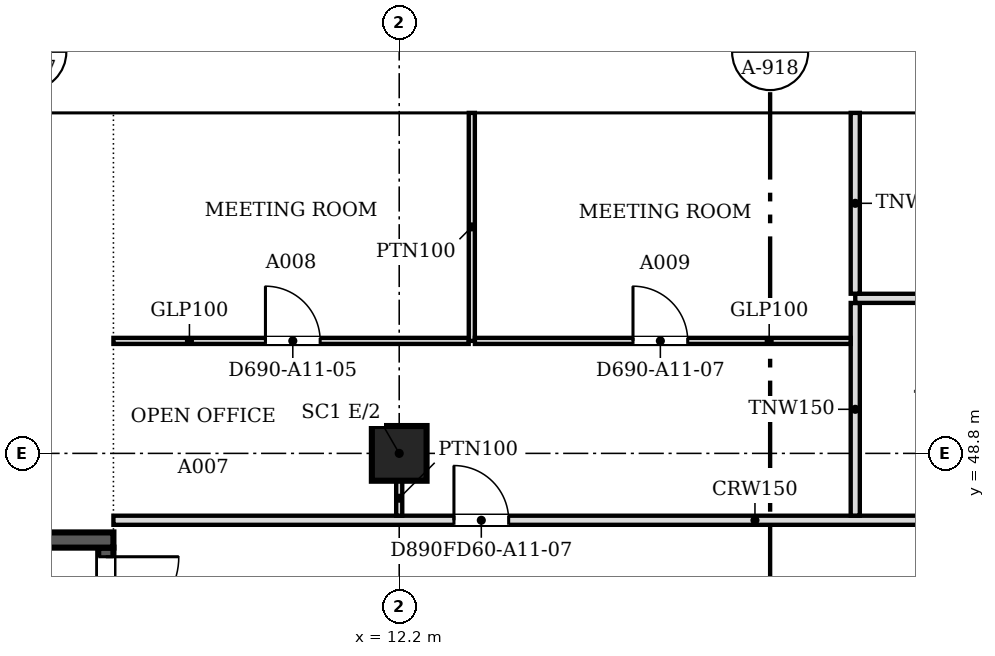
"""IFC4 building model, lengths in metres.
Left out: names, types, materials, properties, quantities, classifications, styles, units other than length and angle.
Written with IfcOpenShell. Run it as: python <this file> out.ifc"""

import sys

from ifc_helpers import new_model, si_unit, direction, frame, frame_2d, origin, origin_2d, place, context, subcontext, project, spatial, polyline, rectangle, outline, extrude, faceted_brep, source, transform, mapped, element, fill, save


model = new_model("IFC4")
c1 = context("Model", 3, precision=1e-05, world=origin(), true_north=direction((0.0, 1.0)))
c2 = subcontext(c1, "Body", "Model", "MODEL_VIEW")
j1 = project(units=[si_unit("LENGTHUNIT", "METRE"), si_unit("PLANEANGLEUNIT", "RADIAN")], contexts=[c1])
p1 = place(None, origin())
s1 = spatial("IfcSite", under=j1, at=p1, CompositionType="ELEMENT")
p2 = place(p1, origin())
s2 = spatial("IfcBuilding", under=s1, at=p2, CompositionType="ELEMENT")
p3 = place(p2, frame((0.0, 0.0, 124.0)))
s3 = spatial("IfcBuildingStorey", under=s2, at=p3, CompositionType="ELEMENT", Elevation=124.0)
p4 = place(p3, frame((12.2, 48.8, 0.0), z_axis=(0.0, 0.0, 1.0), x_axis=(1.0, 0.0, 0.0)))
e1 = element("IfcColumn", 1, at=p4, inside=s3, PredefinedType="COLUMN", context=c2, shape_type="SweptSolid", body=[
    extrude(rectangle(XDim=0.9, YDim=0.9, at=origin_2d()), origin(), (0.0, 0.0, 1.0), 3.6),
])
m1 = source(origin(), c2, "Body", "Brep", [
    faceted_brep([(3.05, -0.25, 0.0), (6.1, -0.25, 3.8), (6.1, -0.25, 3.8), (3.05, -0.25, 7.6), (0.0, -0.25, 3.8), (0.0, 0.25, 3.8), (3.05, 0.25, 7.6), (6.1, 0.25, 3.8), (6.1, 0.25, 3.8), (3.05, 0.25, 0.0)], [[[0, 1, 2, 3, 4]], [[5, 6, 7, 8, 9]], [[9, 8, 1, 0]], [[7, 6, 3, 2]], [[6, 5, 4, 3]], [[5, 9, 0, 4]], [[1, 8, 7, 2]]]),
])
p5 = place(p3, frame((24.4, 54.65, -3.8), z_axis=(0.0, 0.0, 1.0), x_axis=(-1.0, 0.0, 0.0)))
e2 = element("IfcWall", 2, at=p5, inside=s3, PredefinedType="SOLIDWALL", context=c2, shape_type="MappedRepresentation", body=[
    mapped(m1, transform((0.0, 0.0, 0.0), scale=1.0)),
])
m2 = source(origin(), c2, "Body", "SweptSolid", [
    extrude(outline(polyline([(3.05, 0.399), (5.78, 3.8), (3.05, 7.201), (0.321, 3.8), (3.05, 0.399)])), frame((0.0, 0.26, 0.0), z_axis=(0.0, -1.0, 0.0), x_axis=(1.0, 0.0, 0.0)), (0.0, 0.0, 1.0), 0.52),
])
p6 = place(p5, origin())
e3 = element("IfcOpeningElement", 3, at=p6, cuts=e2, PredefinedType="OPENING", context=c2, shape_type="MappedRepresentation", body=[
    mapped(m2, transform((0.0, 0.0, 0.0), scale=1.0)),
])
m3 = source(origin(), c2, "Body", "SweptSolid", [
    extrude(outline(polyline([(3.05, 0.0), (6.1, 3.8), (3.05, 7.6), (0.0, 3.8), (3.05, 0.0)])), frame((0.0, 0.25, 0.0), z_axis=(0.0, -1.0, 0.0), x_axis=(1.0, 0.0, 0.0)), (0.0, 0.0, 1.0), 0.5),
])
p7 = place(p3, frame((18.3, 54.65, -3.8), z_axis=(0.0, 0.0, 1.0), x_axis=(-1.0, 0.0, 0.0)))
e4 = element("IfcWall", 4, at=p7, inside=s3, PredefinedType="SOLIDWALL", context=c2, shape_type="MappedRepresentation", body=[
    mapped(m3, transform((0.0, 0.0, 0.0), scale=1.0)),
])
p8 = place(p7, origin())
e5 = element("IfcOpeningElement", 5, at=p8, cuts=e4, PredefinedType="OPENING", context=c2, shape_type="MappedRepresentation", body=[
    mapped(m2, transform((0.0, 0.0, 0.0), scale=1.0)),
])
m4 = source(origin(), c2, "Body", "Brep", [
    faceted_brep([(3.05, -0.25, 0.0), (6.053, -0.25, 3.8), (3.05, -0.25, 7.6), (0.0, -0.25, 3.8), (0.0, 0.25, 3.8), (3.05, 0.25, 7.6), (6.007, 0.25, 3.859), (6.007, 0.25, 3.741), (3.05, 0.25, 0.0), (6.053, 0.0, 3.8)], [[[0, 1, 2, 3]], [[4, 5, 6, 7, 8]], [[8, 7, 9, 1, 0]], [[6, 5, 2, 1, 9]], [[5, 4, 3, 2]], [[4, 8, 0, 3]], [[9, 7, 6]]]),
])
p9 = place(p3, frame((12.2, 54.65, -3.8), z_axis=(0.0, 0.0, 1.0), x_axis=(-1.0, 0.0, 0.0)))
e6 = element("IfcWall", 6, at=p9, inside=s3, PredefinedType="SOLIDWALL", context=c2, shape_type="MappedRepresentation", body=[
    mapped(m4, transform((0.0, 0.0, 0.0), scale=1.0)),
])
m5 = source(origin(), c2, "Body", "SweptSolid", [
    extrude(outline(polyline([(3.049, 0.401), (5.735, 3.8), (3.049, 7.199), (0.321, 3.8), (3.049, 0.401)])), frame((0.0, 0.26, 0.0), z_axis=(0.0, -1.0, 0.0), x_axis=(1.0, 0.0, 0.0)), (0.0, 0.0, 1.0), 0.52),
])
p10 = place(p9, origin())
e7 = element("IfcOpeningElement", 7, at=p10, cuts=e6, PredefinedType="OPENING", context=c2, shape_type="MappedRepresentation", body=[
    mapped(m5, transform((0.0, 0.0, 0.0), scale=1.0)),
])
p11 = place(p2, frame((0.0, 0.0, 127.8)))
s4 = spatial("IfcBuildingStorey", under=s2, at=p11, CompositionType="ELEMENT", Elevation=127.8)
p12 = place(p11, frame((21.35, 54.65, -3.8), z_axis=(0.0, 0.0, 1.0), x_axis=(-1.0, 0.0, 0.0)))
e8 = element("IfcWall", 8, at=p12, inside=s4, PredefinedType="SOLIDWALL", context=c2, shape_type="MappedRepresentation", body=[
    mapped(m3, transform((0.0, 0.0, 0.0), scale=1.0)),
])
p13 = place(p12, origin())
e9 = element("IfcOpeningElement", 9, at=p13, cuts=e8, PredefinedType="OPENING", context=c2, shape_type="MappedRepresentation", body=[
    mapped(m2, transform((0.0, 0.0, 0.0), scale=1.0)),
])
p14 = place(p11, frame((15.25, 54.65, -3.8), z_axis=(0.0, 0.0, 1.0), x_axis=(-1.0, 0.0, 0.0)))
e10 = element("IfcWall", 10, at=p14, inside=s4, PredefinedType="SOLIDWALL", context=c2, shape_type="MappedRepresentation", body=[
    mapped(m3, transform((0.0, 0.0, 0.0), scale=1.0)),
])
p15 = place(p14, origin())
e11 = element("IfcOpeningElement", 11, at=p15, cuts=e10, PredefinedType="OPENING", context=c2, shape_type="MappedRepresentation", body=[
    mapped(m2, transform((0.0, 0.0, 0.0), scale=1.0)),
])
m6 = source(origin(), c2, "Body", "Brep", [
    faceted_brep([(3.003, -0.25, 0.0), (3.05, -0.25, 0.06), (3.05, -0.25, 7.54), (3.003, -0.25, 7.6), (0.0, -0.25, 3.8), (0.0, 0.25, 3.8), (2.957, 0.25, 7.541), (2.957, 0.25, 0.059), (3.003, 0.0, 0.0), (3.003, 0.0, 7.6)], [[[0, 1, 2, 3, 4]], [[5, 6, 7]], [[1, 0, 8]], [[9, 3, 2]], [[6, 5, 4, 3, 9]], [[5, 7, 8, 0, 4]], [[1, 8, 7, 6, 9, 2]]]),
])
p16 = place(p11, frame((9.15, 54.65, -3.8), z_axis=(0.0, 0.0, 1.0), x_axis=(-1.0, 0.0, 0.0)))
e12 = element("IfcWall", 12, at=p16, inside=s4, PredefinedType="SOLIDWALL", context=c2, shape_type="MappedRepresentation", body=[
    mapped(m6, transform((0.0, 0.0, 0.0), scale=1.0)),
])
m7 = source(origin(), c2, "Body", "SweptSolid", [
    extrude(outline(polyline([(2.803, 6.944), (0.319, 3.8), (2.803, 0.656), (2.803, 6.944)])), frame((0.0, 0.26, 0.0), z_axis=(0.0, -1.0, 0.0), x_axis=(1.0, 0.0, 0.0)), (0.0, 0.0, 1.0), 0.52),
])
p17 = place(p16, origin())
e13 = element("IfcOpeningElement", 13, at=p17, cuts=e12, PredefinedType="OPENING", context=c2, shape_type="MappedRepresentation", body=[
    mapped(m7, transform((0.0, 0.0, 0.0), scale=1.0)),
])
p18 = place(p3, frame((3.6, 47.375, 0.0), z_axis=(0.0, 0.0, 1.0), x_axis=(1.0, 0.0, 0.0)))
e14 = element("IfcWall", 14, at=p18, inside=s3, PredefinedType="SOLIDWALL", context=c2, shape_type="SweptSolid", body=[
    extrude(rectangle(XDim=3.9, YDim=0.25, at=frame_2d((1.95, 0.0))), origin(), (0.0, 0.0, 1.0), 3.8),
])
p19 = place(p3, frame((7.375, 47.25, 0.0), z_axis=(0.0, 0.0, 1.0), x_axis=(0.0, -1.0, 0.0)))
e15 = element("IfcWall", 15, at=p19, inside=s3, PredefinedType="SOLIDWALL", context=c2, shape_type="SweptSolid", body=[
    extrude(rectangle(XDim=8.0, YDim=0.25, at=frame_2d((4.0, 0.0))), origin(), (0.0, 0.0, 1.0), 3.8),
])
m8 = source(origin(), c2, "Body", "SweptSolid", [
    extrude(rectangle(XDim=1.2, YDim=2.1, at=frame_2d((0.6, 1.05))), frame((0.0, 0.135, 0.0), z_axis=(0.0, -1.0, 0.0), x_axis=(1.0, 0.0, 0.0)), (0.0, 0.0, 1.0), 0.27),
])
p20 = place(p19, frame((0.15, 0.0, 0.0)))
e16 = element("IfcOpeningElement", 16, at=p20, cuts=e15, PredefinedType="OPENING", context=c2, shape_type="MappedRepresentation", body=[
    mapped(m8, transform((0.0, 0.0, 0.0), scale=1.0)),
])
p21 = place(p3, frame((7.5, 47.7, 0.0), z_axis=(0.0, 0.0, 1.0), x_axis=(1.0, 0.0, 0.0)))
e17 = element("IfcWall", 17, at=p21, inside=s3, PredefinedType="PARTITIONING", context=c2, shape_type="SweptSolid", body=[
    extrude(rectangle(XDim=20.6, YDim=0.15, at=frame_2d((10.3, 0.0))), origin(), (0.0, 0.0, 1.0), 3.067),
])
m9 = source(origin(), c2, "Body", "SweptSolid", [
    extrude(rectangle(XDim=1.8, YDim=2.1, at=frame_2d((0.9, 1.05))), frame((0.0, 0.085, 0.0), z_axis=(0.0, -1.0, 0.0), x_axis=(1.0, 0.0, 0.0)), (0.0, 0.0, 1.0), 0.17),
])
p22 = place(p21, frame((14.601, 0.0, 0.0)))
e18 = element("IfcOpeningElement", 18, at=p22, cuts=e17, PredefinedType="OPENING", context=c2, shape_type="MappedRepresentation", body=[
    mapped(m9, transform((0.0, 0.0, 0.0), scale=1.0)),
])
m10 = source(origin(), c2, "Body", "SweptSolid", [
    extrude(rectangle(XDim=0.9, YDim=2.1, at=frame_2d((0.45, 1.05))), frame((0.0, 0.085, 0.0), z_axis=(0.0, -1.0, 0.0), x_axis=(1.0, 0.0, 0.0)), (0.0, 0.0, 1.0), 0.17),
])
p23 = place(p21, frame((5.6, 0.0, 0.0)))
e19 = element("IfcOpeningElement", 19, at=p23, cuts=e17, PredefinedType="OPENING", context=c2, shape_type="MappedRepresentation", body=[
    mapped(m10, transform((0.0, 0.0, 0.0), scale=1.0)),
])
p24 = place(p3, frame((19.7, 47.776, 0.0), z_axis=(0.0, 0.0, 1.0), x_axis=(0.0, 1.0, 0.0)))
e20 = element("IfcWall", 20, at=p24, inside=s3, PredefinedType="PARTITIONING", context=c2, shape_type="SweptSolid", body=[
    extrude(rectangle(XDim=3.498, YDim=0.15, at=frame_2d((1.749, 0.0))), origin(), (0.0, 0.0, 1.0), 3.067),
])
p25 = place(p3, frame((12.2, 48.35, 0.0), z_axis=(0.0, 0.0, 1.0), x_axis=(0.0, -1.0, 0.0)))
e21 = element("IfcWall", 21, at=p25, inside=s3, PredefinedType="PARTITIONING", context=c2, shape_type="SweptSolid", body=[
    extrude(rectangle(XDim=0.575, YDim=0.1, at=frame_2d((0.288, 0.0))), origin(), (0.0, 0.0, 1.0), 3.067),
])
p26 = place(p3, frame((7.5, 50.65, 0.0), z_axis=(0.0, 0.0, 1.0), x_axis=(1.0, 0.0, 0.0)))
e22 = element("IfcWall", 22, at=p26, inside=s3, PredefinedType="PARTITIONING", context=c2, shape_type="SweptSolid", body=[
    extrude(rectangle(XDim=5.843, YDim=0.1, at=frame_2d((2.921, 0.0))), origin(), (0.0, 0.0, 1.0), 3.067),
])
m11 = source(origin(), c2, "Body", "SweptSolid", [
    extrude(rectangle(XDim=0.9, YDim=2.1, at=frame_2d((0.45, 1.05))), frame((0.0, 0.06, 0.0), z_axis=(0.0, -1.0, 0.0), x_axis=(1.0, 0.0, 0.0)), (0.0, 0.0, 1.0), 0.12),
])
p27 = place(p26, frame((2.5, 0.0, 0.0)))
e23 = element("IfcOpeningElement", 23, at=p27, cuts=e22, PredefinedType="OPENING", context=c2, shape_type="MappedRepresentation", body=[
    mapped(m11, transform((0.0, 0.0, 0.0), scale=1.0)),
])
p28 = place(p3, frame((13.394, 50.65, 0.0), z_axis=(0.0, 0.0, 1.0), x_axis=(0.0, 1.0, 0.0)))
e24 = element("IfcWall", 24, at=p28, inside=s3, PredefinedType="PARTITIONING", context=c2, shape_type="SweptSolid", body=[
    extrude(rectangle(XDim=3.75, YDim=0.1, at=frame_2d((1.875, 0.0))), origin(), (0.0, 0.0, 1.0), 3.067),
])
p29 = place(p3, frame((13.445, 50.65, 0.0), z_axis=(0.0, 0.0, 1.0), x_axis=(1.0, 0.0, 0.0)))
e25 = element("IfcWall", 25, at=p29, inside=s3, PredefinedType="PARTITIONING", context=c2, shape_type="SweptSolid", body=[
    extrude(rectangle(XDim=6.179, YDim=0.1, at=frame_2d((3.09, 0.0))), origin(), (0.0, 0.0, 1.0), 3.067),
])
p30 = place(p29, frame((2.6, 0.0, 0.0)))
e26 = element("IfcOpeningElement", 26, at=p30, cuts=e25, PredefinedType="OPENING", context=c2, shape_type="MappedRepresentation", body=[
    mapped(m11, transform((0.0, 0.0, 0.0), scale=1.0)),
])
p31 = place(p3, frame((19.7, 51.35, 0.0), z_axis=(0.0, 0.0, 1.0), x_axis=(1.0, 0.0, 0.0)))
e27 = element("IfcWall", 27, at=p31, inside=s3, PredefinedType="PARTITIONING", context=c2, shape_type="SweptSolid", body=[
    extrude(rectangle(XDim=8.4, YDim=0.15, at=frame_2d((4.2, 0.0))), origin(), (0.0, 0.0, 1.0), 3.067),
])
p32 = place(p31, frame((3.7, 0.0, 0.0)))
e28 = element("IfcOpeningElement", 28, at=p32, cuts=e27, PredefinedType="OPENING", context=c2, shape_type="MappedRepresentation", body=[
    mapped(m10, transform((0.0, 0.0, 0.0), scale=1.0)),
])
p33 = place(p3, frame((19.7, 51.426, 0.0), z_axis=(0.0, 0.0, 1.0), x_axis=(0.0, 1.0, 0.0)))
e29 = element("IfcWall", 29, at=p33, inside=s3, PredefinedType="PARTITIONING", context=c2, shape_type="SweptSolid", body=[
    extrude(rectangle(XDim=2.974, YDim=0.15, at=frame_2d((1.487, 0.0))), origin(), (0.0, 0.0, 1.0), 3.067),
])
m12 = source(origin(), c2, "Body", "SweptSolid", [
    extrude(rectangle(XDim=1.2, YDim=2.1, at=frame_2d((0.6, 1.05))), frame((0.0, 0.025, 0.0), z_axis=(0.0, -1.0, 0.0), x_axis=(1.0, 0.0, 0.0)), (0.0, 0.0, 1.0), 0.05),
])
p34 = place(p20, origin())
e30 = element("IfcDoor", 30, at=p34, inside=s3, OperationType="SINGLE_SWING_LEFT", PredefinedType="DOOR", context=c2, shape_type="MappedRepresentation", body=[
    mapped(m12, transform((0.0, 0.0, 0.0), scale=1.0)),
])
fill(e16, e30)
m13 = source(origin(), c2, "Body", "SweptSolid", [
    extrude(rectangle(XDim=0.9, YDim=2.1, at=frame_2d((0.45, 1.05))), frame((0.0, 0.025, 0.0), z_axis=(0.0, -1.0, 0.0), x_axis=(1.0, 0.0, 0.0)), (0.0, 0.0, 1.0), 0.05),
])
p35 = place(p27, origin())
e31 = element("IfcDoor", 31, at=p35, inside=s3, OperationType="SINGLE_SWING_LEFT", PredefinedType="DOOR", context=c2, shape_type="MappedRepresentation", body=[
    mapped(m13, transform((0.0, 0.0, 0.0), scale=1.0)),
])
fill(e23, e31)
p36 = place(p30, origin())
e32 = element("IfcDoor", 32, at=p36, inside=s3, OperationType="SINGLE_SWING_LEFT", PredefinedType="DOOR", context=c2, shape_type="MappedRepresentation", body=[
    mapped(m13, transform((0.0, 0.0, 0.0), scale=1.0)),
])
fill(e26, e32)
p37 = place(p23, origin())
e33 = element("IfcDoor", 33, at=p37, inside=s3, OperationType="SINGLE_SWING_LEFT", PredefinedType="DOOR", context=c2, shape_type="MappedRepresentation", body=[
    mapped(m13, transform((0.0, 0.0, 0.0), scale=1.0)),
])
fill(e19, e33)
save(model, sys.argv[1])
